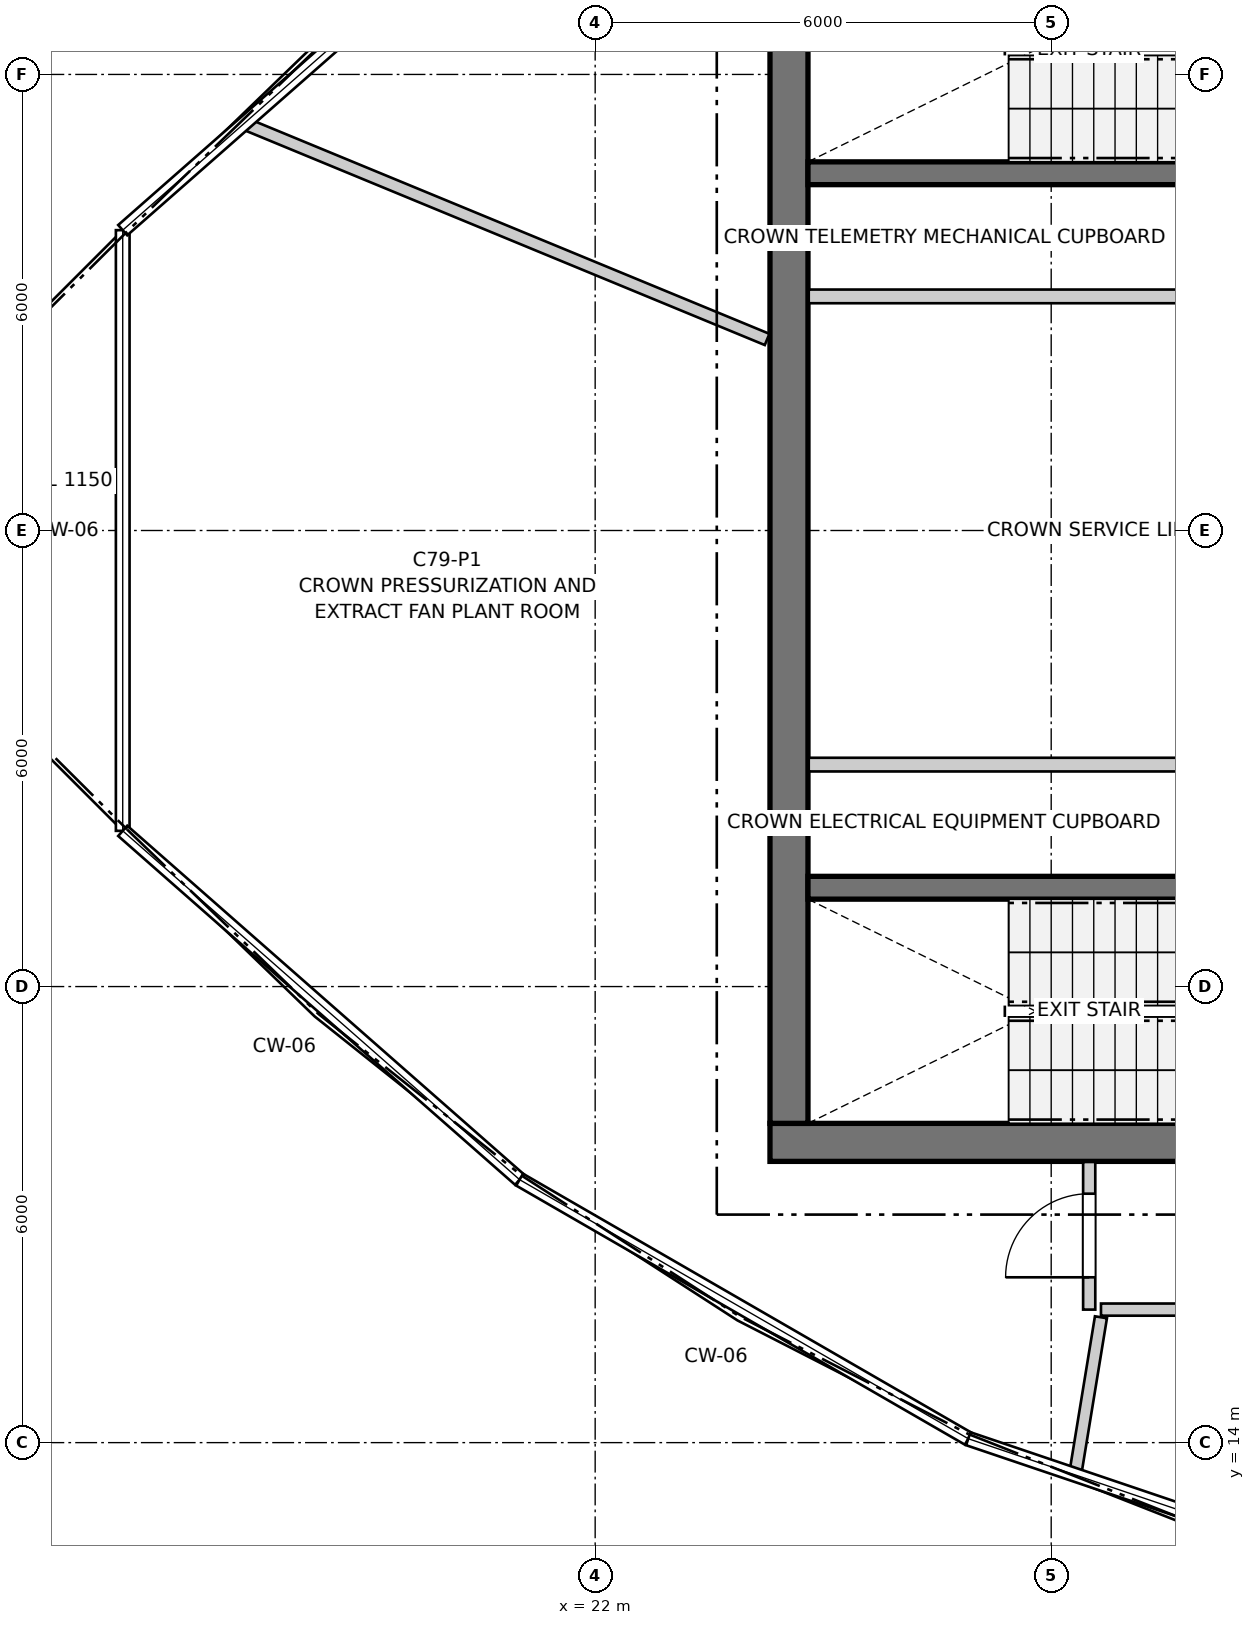
"""IFC4 building model, lengths in metres.
Left out: names, types, materials, properties, quantities, classifications, styles, units other than length and angle.
Written with IfcOpenShell. Run it as: python <this file> out.ifc"""

import sys

from ifc_helpers import new_model, si_unit, direction, frame, frame_2d, origin, place, context, subcontext, project, spatial, rectangle, extrude, source, transform, mapped, element, fill, save


model = new_model("IFC4")
c1 = context("Model", 3, precision=1e-05, world=origin(), true_north=direction((0.0, 1.0)))
c2 = subcontext(c1, "Body", "Model", "MODEL_VIEW")
j1 = project(units=[si_unit("LENGTHUNIT", "METRE"), si_unit("PLANEANGLEUNIT", "RADIAN")], contexts=[c1])
p1 = place(None, origin())
s1 = spatial("IfcSite", under=j1, at=p1, CompositionType="ELEMENT")
p2 = place(p1, origin())
s2 = spatial("IfcBuilding", under=s1, at=p2, CompositionType="ELEMENT")
p3 = place(p2, frame((0.0, 0.0, 266.1)))
s3 = spatial("IfcBuildingStorey", under=s2, at=p3, CompositionType="ELEMENT", Elevation=266.1)
p4 = place(p3, frame((24.3, 17.95, 0.0), z_axis=(0.0, 0.0, 1.0), x_axis=(1.0, 0.0, 0.0)))
e1 = element("IfcWall", 1, at=p4, inside=s3, PredefinedType="SHEAR", context=c2, shape_type="SweptSolid", body=[
    extrude(rectangle(XDim=12.1, YDim=0.5, at=frame_2d((6.05, 0.0))), origin(), (0.0, 0.0, 1.0), 4.05),
])
p5 = place(p3, frame((24.55, 33.8, 0.0), z_axis=(0.0, 0.0, 1.0), x_axis=(0.0, -1.0, 0.0)))
e2 = element("IfcWall", 2, at=p5, inside=s3, PredefinedType="SHEAR", context=c2, shape_type="SweptSolid", body=[
    extrude(rectangle(XDim=15.6, YDim=0.5, at=frame_2d((7.8, 0.0))), origin(), (0.0, 0.0, 1.0), 4.05),
])
p6 = place(p3, frame((24.8, 21.3, 0.0), z_axis=(0.0, 0.0, 1.0), x_axis=(1.0, 0.0, 0.0)))
e3 = element("IfcWall", 3, at=p6, inside=s3, PredefinedType="SHEAR", context=c2, shape_type="SweptSolid", body=[
    extrude(rectangle(XDim=11.1, YDim=0.3, at=frame_2d((5.55, 0.0))), origin(), (0.0, 0.0, 1.0), 4.05),
])
p7 = place(p6, frame((6.22, 0.0, 0.0)))
e4 = element("IfcOpeningElement", 4, at=p7, cuts=e3, PredefinedType="OPENING", context=c2, shape_type="SweptSolid", body=[
    extrude(rectangle(XDim=0.98, YDim=2.15, at=frame_2d((0.49, 1.075))), frame((0.0, 0.16, 0.0), z_axis=(0.0, -1.0, 0.0), x_axis=(1.0, 0.0, 0.0)), (0.0, 0.0, 1.0), 0.32),
])
p8 = place(p6, frame((9.15, 0.0, 0.0)))
e5 = element("IfcOpeningElement", 5, at=p8, cuts=e3, PredefinedType="OPENING", context=c2, shape_type="SweptSolid", body=[
    extrude(rectangle(XDim=1.15, YDim=2.15, at=frame_2d((0.575, 1.075))), frame((0.0, 0.16, 0.0), z_axis=(0.0, -1.0, 0.0), x_axis=(1.0, 0.0, 0.0)), (0.0, 0.0, 1.0), 0.32),
])
p9 = place(p3, frame((24.8, 30.7, 0.0), z_axis=(0.0, 0.0, 1.0), x_axis=(1.0, 0.0, 0.0)))
e6 = element("IfcWall", 6, at=p9, inside=s3, PredefinedType="SHEAR", context=c2, shape_type="SweptSolid", body=[
    extrude(rectangle(XDim=11.1, YDim=0.3, at=frame_2d((5.55, 0.0))), origin(), (0.0, 0.0, 1.0), 4.05),
])
p10 = place(p9, frame((6.22, 0.0, 0.0)))
e7 = element("IfcOpeningElement", 7, at=p10, cuts=e6, PredefinedType="OPENING", context=c2, shape_type="SweptSolid", body=[
    extrude(rectangle(XDim=0.98, YDim=2.15, at=frame_2d((0.49, 1.075))), frame((0.0, 0.16, 0.0), z_axis=(0.0, -1.0, 0.0), x_axis=(1.0, 0.0, 0.0)), (0.0, 0.0, 1.0), 0.32),
])
p11 = place(p9, frame((9.15, 0.0, 0.0)))
e8 = element("IfcOpeningElement", 8, at=p11, cuts=e6, PredefinedType="OPENING", context=c2, shape_type="SweptSolid", body=[
    extrude(rectangle(XDim=1.15, YDim=2.15, at=frame_2d((0.575, 1.075))), frame((0.0, 0.16, 0.0), z_axis=(0.0, -1.0, 0.0), x_axis=(1.0, 0.0, 0.0)), (0.0, 0.0, 1.0), 0.32),
])
for number, where, z_axis, x_axis in (
    (9, (24.81, 22.92, 0.0), (0.0, 0.0, 1.0), (1.0, 0.0, 0.0)),
    (10, (24.81, 29.08, 0.0), (0.0, 0.0, 1.0), (1.0, 0.0, 0.0)),
):
    element("IfcWall", number, at=place(p3, frame(where, z_axis=z_axis, x_axis=x_axis)), inside=s3, PredefinedType="PARTITIONING", context=c2, shape_type="SweptSolid", body=[
        extrude(rectangle(XDim=5.84, YDim=0.18, at=frame_2d((2.92, 0.0))), origin(), (0.0, 0.0, 1.0), 4.05),
    ])
p12 = place(p3, frame((28.5, 15.75, 0.0), z_axis=(0.0, 0.0, 1.0), x_axis=(0.0, 1.0, 0.0)))
e11 = element("IfcWall", 11, at=p12, inside=s3, PredefinedType="PARTITIONING", context=c2, shape_type="SweptSolid", body=[
    extrude(rectangle(XDim=1.942, YDim=0.16, at=frame_2d((0.971, 0.0))), origin(), (0.0, 0.0, 1.0), 3.318),
])
p13 = place(p12, frame((0.425, 0.0, 0.0)))
e12 = element("IfcOpeningElement", 12, at=p13, cuts=e11, PredefinedType="OPENING", context=c2, shape_type="SweptSolid", body=[
    extrude(rectangle(XDim=1.1, YDim=2.15, at=frame_2d((0.55, 1.075))), frame((0.0, 0.09, 0.0), z_axis=(0.0, -1.0, 0.0), x_axis=(1.0, 0.0, 0.0)), (0.0, 0.0, 1.0), 0.18),
])
p14 = place(p3, frame((28.655, 15.75, 0.0), z_axis=(0.0, 0.0, 1.0), x_axis=(1.0, 0.0, 0.0)))
e13 = element("IfcWall", 13, at=p14, inside=s3, PredefinedType="PARTITIONING", context=c2, shape_type="SweptSolid", body=[
    extrude(rectangle(XDim=9.907, YDim=0.16, at=frame_2d((4.954, 0.0))), origin(), (0.0, 0.0, 1.0), 4.05),
])
p15 = place(p3, frame((17.407, 31.344, 0.0), z_axis=(0.0, 0.0, 1.0), x_axis=(0.92431974827, -0.381618923743, 0.0)))
e14 = element("IfcWall", 14, at=p15, inside=s3, PredefinedType="PARTITIONING", context=c2, shape_type="SweptSolid", body=[
    extrude(rectangle(XDim=7.416, YDim=0.16, at=frame_2d((3.708, 0.0))), origin(), (0.0, 0.0, 1.0), 4.05),
])
p16 = place(p3, frame((28.319, 13.603, 0.0), z_axis=(0.0, 0.0, 1.0), x_axis=(0.161630316239, 0.986851377297, 0.0)))
e15 = element("IfcWall", 15, at=p16, inside=s3, PredefinedType="PARTITIONING", context=c2, shape_type="SweptSolid", body=[
    extrude(rectangle(XDim=2.074, YDim=0.16, at=frame_2d((1.037, 0.0))), origin(), (0.0, 0.0, 1.0), 4.05),
])
m1 = source(origin(), c2, "Body", "SweptSolid", [
    extrude(rectangle(XDim=1.1, YDim=2.15, at=frame_2d((0.55, 1.075))), frame((0.0, 0.025, 0.0), z_axis=(0.0, -1.0, 0.0), x_axis=(1.0, 0.0, 0.0)), (0.0, 0.0, 1.0), 0.05),
])
p17 = place(p13, origin())
e16 = element("IfcDoor", 16, at=p17, inside=s3, OperationType="SINGLE_SWING_LEFT", PredefinedType="DOOR", context=c2, shape_type="MappedRepresentation", body=[
    mapped(m1, transform((0.0, 0.0, 0.0), x_axis=(1.0, 0.0, 0.0), y_axis=(0.0, 1.0, 0.0), z_axis=(0.0, 0.0, 1.0), scale=1.0)),
])
fill(e12, e16)
save(model, sys.argv[1])
